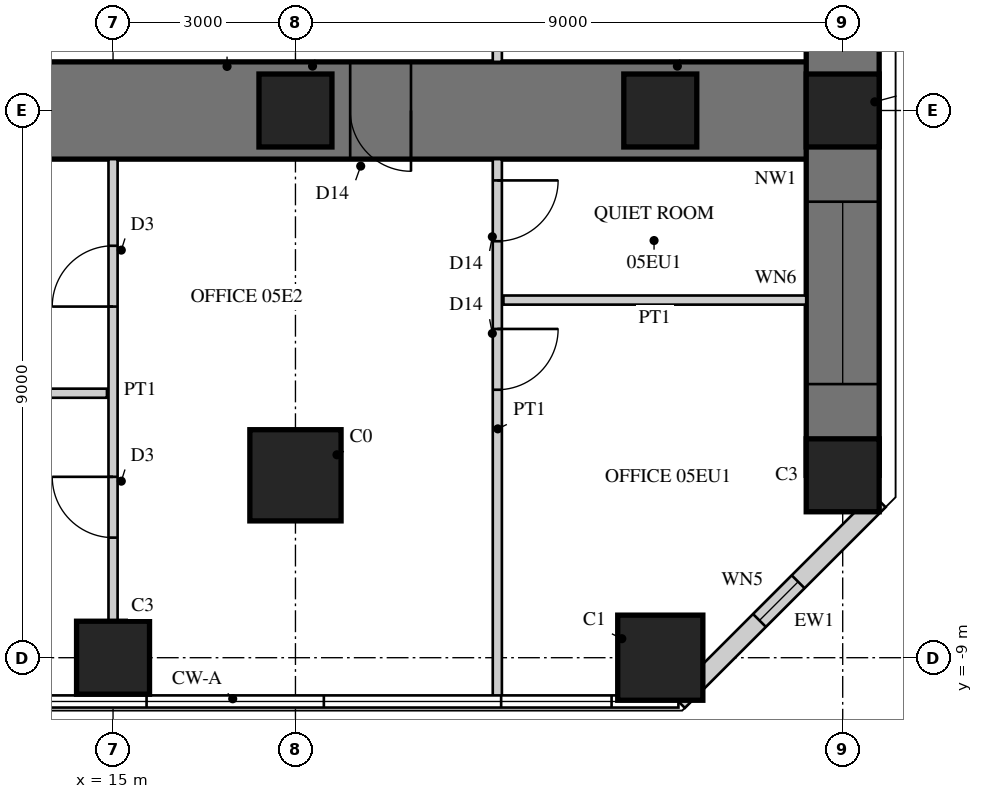
"""IFC4 building model, lengths in metres.
Left out: names, types, materials, properties, quantities, classifications, styles, units other than length and angle.
Written with IfcOpenShell. Run it as: python <this file> out.ifc"""

import sys

from ifc_helpers import new_model, si_unit, direction, frame, frame_2d, origin, origin_2d, place, context, subcontext, project, spatial, rectangle, hollow_rectangle, extrude, element, fill, save


model = new_model("IFC4")
c1 = context("Model", 3, precision=1e-05, world=origin(), true_north=direction((0.0, 1.0)))
c2 = subcontext(c1, "Body", "Model", "MODEL_VIEW")
j1 = project(units=[si_unit("LENGTHUNIT", "METRE"), si_unit("PLANEANGLEUNIT", "RADIAN")], contexts=[c1])
p1 = place(None, origin())
s1 = spatial("IfcSite", under=j1, at=p1, CompositionType="ELEMENT")
p2 = place(p1, origin())
s2 = spatial("IfcBuilding", under=s1, at=p2, CompositionType="ELEMENT")
p3 = place(p2, frame((0.0, 0.0, 23.5)))
s3 = spatial("IfcBuildingStorey", under=s2, at=p3, CompositionType="ELEMENT", Elevation=23.5)
p4 = place(p3, frame((9.0, 0.0, 0.0), z_axis=(0.0, 0.0, 1.0), x_axis=(1.0, 0.0, 0.0)))
e1 = element("IfcWall", 1, at=p4, inside=s3, PredefinedType="SHEAR", context=c2, shape_type="SweptSolid", body=[
    extrude(rectangle(XDim=18.0, YDim=1.6, at=frame_2d((9.0, 0.0))), origin(), (0.0, 0.0, 1.0), 4.0),
])
p5 = place(p4, frame((9.9, 0.0, 0.0)))
e2 = element("IfcOpeningElement", 2, at=p5, cuts=e1, PredefinedType="OPENING", context=c2, shape_type="SweptSolid", body=[
    extrude(rectangle(XDim=1.0, YDim=2.2, at=frame_2d((0.5, 1.1))), frame((0.0, 0.81, 0.0), z_axis=(0.0, -1.0, 0.0), x_axis=(1.0, 0.0, 0.0)), (0.0, 0.0, 1.0), 1.62),
])
p6 = place(p3, frame((27.0, -6.0, 0.0), z_axis=(0.0, 0.0, 1.0), x_axis=(0.0, 1.0, 0.0)))
e3 = element("IfcWall", 3, at=p6, inside=s3, PredefinedType="SHEAR", context=c2, shape_type="SweptSolid", body=[
    extrude(rectangle(XDim=12.0, YDim=1.2, at=frame_2d((6.0, 0.0))), origin(), (0.0, 0.0, 1.0), 4.0),
])
p7 = place(p6, frame((1.5, 0.0, 0.6)))
e4 = element("IfcOpeningElement", 4, at=p7, cuts=e3, PredefinedType="OPENING", context=c2, shape_type="SweptSolid", body=[
    extrude(rectangle(XDim=3.0, YDim=2.4, at=frame_2d((1.5, 1.2))), frame((0.0, 0.61, 0.0), z_axis=(0.0, -1.0, 0.0), x_axis=(1.0, 0.0, 0.0)), (0.0, 0.0, 1.0), 1.22),
])
p8 = place(p6, frame((7.5, 0.0, 0.6)))
e5 = element("IfcOpeningElement", 5, at=p8, cuts=e3, PredefinedType="OPENING", context=c2, shape_type="SweptSolid", body=[
    extrude(rectangle(XDim=3.0, YDim=2.4, at=frame_2d((1.5, 1.2))), frame((0.0, 0.61, 0.0), z_axis=(0.0, -1.0, 0.0), x_axis=(1.0, 0.0, 0.0)), (0.0, 0.0, 1.0), 1.22),
])
p9 = place(p3, frame((15.0, -9.0, 0.0), z_axis=(0.0, 0.0, 1.0), x_axis=(1.0, 0.0, 0.0)))
e6 = element("IfcColumn", 6, at=p9, inside=s3, PredefinedType="COLUMN", context=c2, shape_type="SweptSolid", body=[
    extrude(rectangle(XDim=1.2, YDim=1.2, at=origin_2d()), origin(), (0.0, 0.0, 1.0), 4.0),
])
p10 = place(p3, frame((24.0, -9.0, 0.0), z_axis=(0.0, 0.0, 1.0), x_axis=(1.0, 0.0, 0.0)))
e7 = element("IfcColumn", 7, at=p10, inside=s3, PredefinedType="COLUMN", context=c2, shape_type="SweptSolid", body=[
    extrude(rectangle(XDim=1.4, YDim=1.4, at=origin_2d()), origin(), (0.0, 0.0, 1.0), 4.0),
])
for number, where, z_axis, x_axis in (
    (8, (27.0, -6.0, 0.0), (0.0, 0.0, 1.0), (1.0, 0.0, 0.0)),
    (9, (27.0, 0.0, 0.0), (0.0, 0.0, 1.0), (1.0, 0.0, 0.0)),
):
    element("IfcColumn", number, at=place(p3, frame(where, z_axis=z_axis, x_axis=x_axis)), inside=s3, PredefinedType="COLUMN", context=c2, shape_type="SweptSolid", body=[
        extrude(rectangle(XDim=1.2, YDim=1.2, at=origin_2d()), origin(), (0.0, 0.0, 1.0), 4.0),
    ])
p11 = place(p3, frame((18.0, -6.0, -0.2), z_axis=(0.0, 0.0, 1.0), x_axis=(1.0, 0.0, 0.0)))
e10 = element("IfcColumn", 10, at=p11, inside=s3, PredefinedType="COLUMN", context=c2, shape_type="SweptSolid", body=[
    extrude(rectangle(XDim=1.5, YDim=1.5, at=origin_2d()), origin(), (0.0, 0.0, 1.0), 4.2),
])
for number, where, z_axis, x_axis in (
    (11, (18.0, 0.0, 0.0), (0.0, 0.0, 1.0), (1.0, 0.0, 0.0)),
    (12, (24.0, 0.0, 0.0), (0.0, 0.0, 1.0), (1.0, 0.0, 0.0)),
):
    element("IfcColumn", number, at=place(p3, frame(where, z_axis=z_axis, x_axis=x_axis)), inside=s3, PredefinedType="COLUMN", context=c2, shape_type="SweptSolid", body=[
        extrude(rectangle(XDim=1.2, YDim=1.2, at=origin_2d()), origin(), (0.0, 0.0, 1.0), 4.0),
    ])
p12 = place(p3, frame((24.298, -9.72, 0.0), z_axis=(0.0, 0.0, 1.0), x_axis=(0.707106781187, 0.707106781187, 0.0)))
e13 = element("IfcWall", 13, at=p12, inside=s3, PredefinedType="SOLIDWALL", context=c2, shape_type="SweptSolid", body=[
    extrude(rectangle(XDim=4.669, YDim=0.3, at=frame_2d((2.335, 0.0))), origin(), (0.0, 0.0, 1.0), 3.8),
])
p13 = place(p12, frame((1.885, 0.0, 0.3)))
e14 = element("IfcOpeningElement", 14, at=p13, cuts=e13, PredefinedType="OPENING", context=c2, shape_type="SweptSolid", body=[
    extrude(rectangle(XDim=0.9, YDim=2.4, at=frame_2d((0.45, 1.2))), frame((0.0, 0.16, 0.0), z_axis=(0.0, -1.0, 0.0), x_axis=(1.0, 0.0, 0.0)), (0.0, 0.0, 1.0), 0.32),
])
p14 = place(p3, frame((15.0, -8.4, 0.0), z_axis=(0.0, 0.0, 1.0), x_axis=(0.0, 1.0, 0.0)))
e15 = element("IfcWall", 15, at=p14, inside=s3, PredefinedType="PARTITIONING", context=c2, shape_type="SweptSolid", body=[
    extrude(rectangle(XDim=7.6, YDim=0.15, at=frame_2d((3.8, 0.0))), origin(), (0.0, 0.0, 1.0), 2.95),
])
p15 = place(p14, frame((1.375, 0.0, 0.0)))
e16 = element("IfcOpeningElement", 16, at=p15, cuts=e15, PredefinedType="OPENING", context=c2, shape_type="SweptSolid", body=[
    extrude(rectangle(XDim=1.0, YDim=2.1, at=frame_2d((0.5, 1.05))), frame((0.0, 0.085, 0.0), z_axis=(0.0, -1.0, 0.0), x_axis=(1.0, 0.0, 0.0)), (0.0, 0.0, 1.0), 0.17),
])
p16 = place(p14, frame((5.175, 0.0, 0.0)))
e17 = element("IfcOpeningElement", 17, at=p16, cuts=e15, PredefinedType="OPENING", context=c2, shape_type="SweptSolid", body=[
    extrude(rectangle(XDim=1.0, YDim=2.1, at=frame_2d((0.5, 1.05))), frame((0.0, 0.085, 0.0), z_axis=(0.0, -1.0, 0.0), x_axis=(1.0, 0.0, 0.0)), (0.0, 0.0, 1.0), 0.17),
])
p17 = place(p3, frame((9.65, -4.65, 0.0), z_axis=(0.0, 0.0, 1.0), x_axis=(1.0, 0.0, 0.0)))
e18 = element("IfcWall", 18, at=p17, inside=s3, PredefinedType="PARTITIONING", context=c2, shape_type="SweptSolid", body=[
    extrude(rectangle(XDim=5.25, YDim=0.15, at=frame_2d((2.625, 0.0))), origin(), (0.0, 0.0, 1.0), 3.8),
])
p18 = place(p3, frame((21.32, 0.8, 0.0), z_axis=(0.0, 0.0, 1.0), x_axis=(0.0, 1.0, 0.0)))
e19 = element("IfcWall", 19, at=p18, inside=s3, PredefinedType="PARTITIONING", context=c2, shape_type="SweptSolid", body=[
    extrude(rectangle(XDim=8.88, YDim=0.15, at=frame_2d((4.44, 0.0))), origin(), (0.0, 0.0, 1.0), 3.8),
])
p19 = place(p18, frame((0.45, 0.0, 0.0)))
e20 = element("IfcOpeningElement", 20, at=p19, cuts=e19, PredefinedType="OPENING", context=c2, shape_type="SweptSolid", body=[
    extrude(rectangle(XDim=1.0, YDim=2.2, at=frame_2d((0.5, 1.1))), frame((0.0, 0.085, 0.0), z_axis=(0.0, -1.0, 0.0), x_axis=(1.0, 0.0, 0.0)), (0.0, 0.0, 1.0), 0.17),
])
p20 = place(p3, frame((21.42, -3.118, 0.0), z_axis=(0.0, 0.0, 1.0), x_axis=(1.0, 0.0, 0.0)))
e21 = element("IfcWall", 21, at=p20, inside=s3, PredefinedType="PARTITIONING", context=c2, shape_type="SweptSolid", body=[
    extrude(rectangle(XDim=4.98, YDim=0.15, at=frame_2d((2.49, 0.0))), origin(), (0.0, 0.0, 1.0), 3.8),
])
p21 = place(p3, frame((21.32, -9.68, 0.0), z_axis=(0.0, 0.0, 1.0), x_axis=(0.0, 1.0, 0.0)))
e22 = element("IfcWall", 22, at=p21, inside=s3, PredefinedType="PARTITIONING", context=c2, shape_type="SweptSolid", body=[
    extrude(rectangle(XDim=8.88, YDim=0.15, at=frame_2d((4.44, 0.0))), origin(), (0.0, 0.0, 1.0), 3.8),
])
p22 = place(p21, frame((5.087, 0.0, 0.0)))
e23 = element("IfcOpeningElement", 23, at=p22, cuts=e22, PredefinedType="OPENING", context=c2, shape_type="SweptSolid", body=[
    extrude(rectangle(XDim=1.0, YDim=2.2, at=frame_2d((0.5, 1.1))), frame((0.0, 0.085, 0.0), z_axis=(0.0, -1.0, 0.0), x_axis=(1.0, 0.0, 0.0)), (0.0, 0.0, 1.0), 0.17),
])
p23 = place(p21, frame((7.53, 0.0, 0.0)))
e24 = element("IfcOpeningElement", 24, at=p23, cuts=e22, PredefinedType="OPENING", context=c2, shape_type="SweptSolid", body=[
    extrude(rectangle(XDim=1.0, YDim=2.2, at=frame_2d((0.5, 1.1))), frame((0.0, 0.085, 0.0), z_axis=(0.0, -1.0, 0.0), x_axis=(1.0, 0.0, 0.0)), (0.0, 0.0, 1.0), 0.17),
])
p24 = place(p13, origin())
e25 = element("IfcWindow", 25, at=p24, inside=s3, PartitioningType="SINGLE_PANEL", PredefinedType="WINDOW", context=c2, shape_type="SweptSolid", body=[
    extrude(hollow_rectangle(XDim=0.9, YDim=2.4, WallThickness=0.06, at=frame_2d((0.45, 1.2))), frame((0.0, 0.03, 0.0), z_axis=(0.0, -1.0, 0.0), x_axis=(1.0, 0.0, 0.0)), (0.0, 0.0, 1.0), 0.06),
    extrude(rectangle(XDim=0.779, YDim=2.279, at=frame_2d((0.45, 1.2))), frame((0.0, 0.03, 0.0), z_axis=(0.0, -1.0, 0.0), x_axis=(1.0, 0.0, 0.0)), (0.0, 0.0, 1.0), 0.06),
])
fill(e14, e25)
p25 = place(p7, origin())
e26 = element("IfcWindow", 26, at=p25, inside=s3, PartitioningType="SINGLE_PANEL", PredefinedType="WINDOW", context=c2, shape_type="SweptSolid", body=[
    extrude(hollow_rectangle(XDim=3.0, YDim=2.4, WallThickness=0.06, at=frame_2d((1.5, 1.2))), frame((0.0, 0.03, 0.0), z_axis=(0.0, -1.0, 0.0), x_axis=(1.0, 0.0, 0.0)), (0.0, 0.0, 1.0), 0.06),
    extrude(rectangle(XDim=2.879, YDim=2.279, at=frame_2d((1.5, 1.2))), frame((0.0, 0.03, 0.0), z_axis=(0.0, -1.0, 0.0), x_axis=(1.0, 0.0, 0.0)), (0.0, 0.0, 1.0), 0.06),
])
fill(e4, e26)
p26 = place(p15, origin())
e27 = element("IfcDoor", 27, at=p26, inside=s3, OperationType="SINGLE_SWING_RIGHT", PredefinedType="DOOR", context=c2, shape_type="SweptSolid", body=[
    extrude(rectangle(XDim=1.0, YDim=2.1, at=frame_2d((0.5, 1.05))), frame((0.0, 0.025, 0.0), z_axis=(0.0, -1.0, 0.0), x_axis=(1.0, 0.0, 0.0)), (0.0, 0.0, 1.0), 0.05),
])
fill(e16, e27)
p27 = place(p16, origin())
e28 = element("IfcDoor", 28, at=p27, inside=s3, OperationType="SINGLE_SWING_LEFT", PredefinedType="DOOR", context=c2, shape_type="SweptSolid", body=[
    extrude(rectangle(XDim=1.0, YDim=2.1, at=frame_2d((0.5, 1.05))), frame((0.0, 0.025, 0.0), z_axis=(0.0, -1.0, 0.0), x_axis=(1.0, 0.0, 0.0)), (0.0, 0.0, 1.0), 0.05),
])
fill(e17, e28)
p28 = place(p22, frame((1.0, 0.0, 0.0), z_axis=(0.0, 0.0, 1.0), x_axis=(-1.0, 0.0, 0.0)))
e29 = element("IfcDoor", 29, at=p28, inside=s3, OperationType="SINGLE_SWING_LEFT", PredefinedType="DOOR", context=c2, shape_type="SweptSolid", body=[
    extrude(rectangle(XDim=1.0, YDim=2.2, at=frame_2d((0.5, 1.1))), frame((0.0, 0.025, 0.0), z_axis=(0.0, -1.0, 0.0), x_axis=(1.0, 0.0, 0.0)), (0.0, 0.0, 1.0), 0.05),
])
fill(e23, e29)
p29 = place(p23, frame((1.0, 0.0, 0.0), z_axis=(0.0, 0.0, 1.0), x_axis=(-1.0, 0.0, 0.0)))
e30 = element("IfcDoor", 30, at=p29, inside=s3, OperationType="SINGLE_SWING_LEFT", PredefinedType="DOOR", context=c2, shape_type="SweptSolid", body=[
    extrude(rectangle(XDim=1.0, YDim=2.2, at=frame_2d((0.5, 1.1))), frame((0.0, 0.025, 0.0), z_axis=(0.0, -1.0, 0.0), x_axis=(1.0, 0.0, 0.0)), (0.0, 0.0, 1.0), 0.05),
])
fill(e24, e30)
p30 = place(p5, frame((1.0, 0.0, 0.0), z_axis=(0.0, 0.0, 1.0), x_axis=(-1.0, 0.0, 0.0)))
e31 = element("IfcDoor", 31, at=p30, inside=s3, OperationType="SINGLE_SWING_LEFT", PredefinedType="DOOR", context=c2, shape_type="SweptSolid", body=[
    extrude(rectangle(XDim=1.0, YDim=2.2, at=frame_2d((0.5, 1.1))), frame((0.0, 0.025, 0.0), z_axis=(0.0, -1.0, 0.0), x_axis=(1.0, 0.0, 0.0)), (0.0, 0.0, 1.0), 0.05),
])
fill(e2, e31)
save(model, sys.argv[1])
